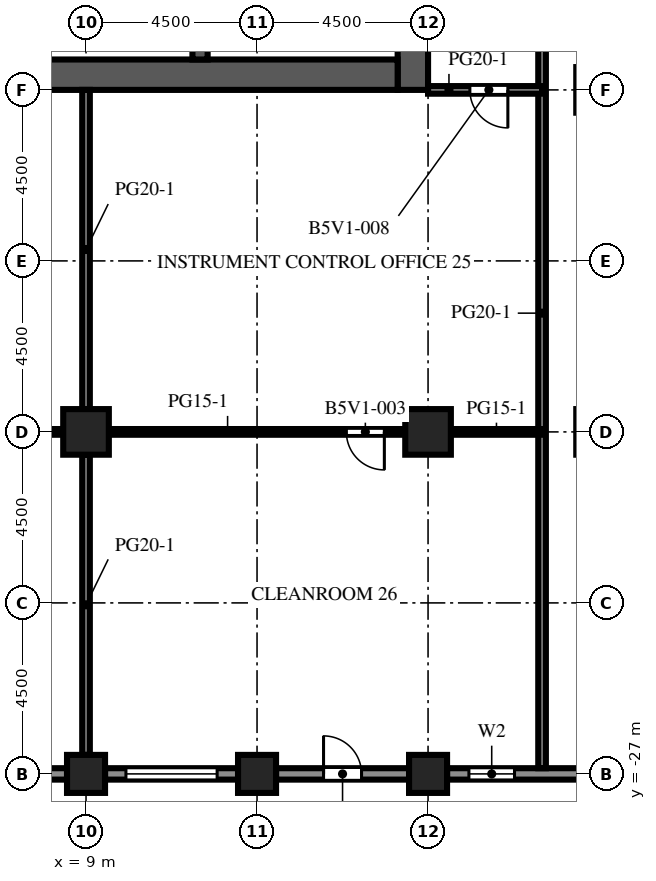
"""IFC4 building model, lengths in metres.
Left out: names, types, materials, properties, quantities, classifications, styles, units other than length and angle.
Written with IfcOpenShell. Run it as: python <this file> out.ifc"""

import sys

from ifc_helpers import new_model, si_unit, direction, frame, frame_2d, origin, origin_2d, place, context, subcontext, project, spatial, rectangle, extrude, element, fill, save


model = new_model("IFC4")
c1 = context("Model", 3, precision=1e-05, world=origin(), true_north=direction((0.0, 1.0)))
c2 = subcontext(c1, "Body", "Model", "MODEL_VIEW")
j1 = project(units=[si_unit("LENGTHUNIT", "METRE"), si_unit("PLANEANGLEUNIT", "RADIAN")], contexts=[c1])
p1 = place(None, origin())
s1 = spatial("IfcSite", under=j1, at=p1, CompositionType="ELEMENT")
p2 = place(p1, origin())
s2 = spatial("IfcBuilding", under=s1, at=p2, CompositionType="ELEMENT")
p3 = place(p2, frame((0.0, 0.0, 173.2)))
s3 = spatial("IfcBuildingStorey", under=s2, at=p3, CompositionType="ELEMENT", Elevation=173.2)
for number, where, z_axis, x_axis in (
    (1, (9.0, -27.0, 0.0), (0.0, 0.0, 1.0), (1.0, 0.0, 0.0)),
    (2, (13.5, -27.0, 0.0), (0.0, 0.0, 1.0), (1.0, 0.0, 0.0)),
    (3, (18.0, -27.0, 0.0), (0.0, 0.0, 1.0), (1.0, 0.0, 0.0)),
):
    element("IfcColumn", number, at=place(p3, frame(where, z_axis=z_axis, x_axis=x_axis)), inside=s3, PredefinedType="COLUMN", context=c2, shape_type="SweptSolid", body=[
        extrude(rectangle(XDim=1.0, YDim=1.0, at=origin_2d()), origin(), (0.0, 0.0, 1.0), 4.1),
    ])
for number, where, z_axis, x_axis in (
    (4, (9.0, -18.0, 0.0), (0.0, 0.0, 1.0), (1.0, 0.0, 0.0)),
    (5, (18.0, -18.0, 0.0), (0.0, 0.0, 1.0), (1.0, 0.0, 0.0)),
):
    element("IfcColumn", number, at=place(p3, frame(where, z_axis=z_axis, x_axis=x_axis)), inside=s3, PredefinedType="COLUMN", context=c2, shape_type="SweptSolid", body=[
        extrude(rectangle(XDim=1.2, YDim=1.2, at=origin_2d()), origin(), (0.0, 0.0, 1.0), 4.1),
    ])
p4 = place(p3, frame((17.6, -9.0, 0.0), z_axis=(0.0, 0.0, 1.0), x_axis=(0.0, 1.0, 0.0)))
e6 = element("IfcWall", 6, at=p4, inside=s3, PredefinedType="SHEAR", context=c2, shape_type="SweptSolid", body=[
    extrude(rectangle(XDim=27.5, YDim=0.8, at=frame_2d((13.75, 0.0))), origin(), (0.0, 0.0, 1.0), 4.1),
])
p5 = place(p4, frame((12.55, 0.0, 0.0)))
e7 = element("IfcOpeningElement", 7, at=p5, cuts=e6, PredefinedType="OPENING", context=c2, shape_type="SweptSolid", body=[
    extrude(rectangle(XDim=2.4, YDim=2.4, at=frame_2d((1.2, 1.2))), frame((0.0, 0.41, 0.0), z_axis=(0.0, -1.0, 0.0), x_axis=(1.0, 0.0, 0.0)), (0.0, 0.0, 1.0), 0.82),
])
p6 = place(p4, frame((6.825, 0.0, 0.0)))
e8 = element("IfcOpeningElement", 8, at=p6, cuts=e6, PredefinedType="OPENING", context=c2, shape_type="SweptSolid", body=[
    extrude(rectangle(XDim=1.2, YDim=2.1, at=frame_2d((0.6, 1.05))), frame((0.0, 0.41, 0.0), z_axis=(0.0, -1.0, 0.0), x_axis=(1.0, 0.0, 0.0)), (0.0, 0.0, 1.0), 0.82),
])
p7 = place(p4, frame((19.475, 0.0, 0.0)))
e9 = element("IfcOpeningElement", 9, at=p7, cuts=e6, PredefinedType="OPENING", context=c2, shape_type="SweptSolid", body=[
    extrude(rectangle(XDim=1.2, YDim=2.1, at=frame_2d((0.6, 1.05))), frame((0.0, 0.41, 0.0), z_axis=(0.0, -1.0, 0.0), x_axis=(1.0, 0.0, 0.0)), (0.0, 0.0, 1.0), 0.82),
])
p8 = place(p3, frame((6.8, -8.6, 0.0), z_axis=(0.0, 0.0, 1.0), x_axis=(1.0, 0.0, 0.0)))
e10 = element("IfcWall", 10, at=p8, inside=s3, PredefinedType="SHEAR", context=c2, shape_type="SweptSolid", body=[
    extrude(rectangle(XDim=10.4, YDim=0.8, at=frame_2d((5.2, 0.0))), origin(), (0.0, 0.0, 1.0), 4.1),
])
p9 = place(p3, frame((12.0, -8.2, 0.0), z_axis=(0.0, 0.0, 1.0), x_axis=(0.0, 1.0, 0.0)))
e11 = element("IfcWall", 11, at=p9, inside=s3, PredefinedType="SHEAR", context=c2, shape_type="SweptSolid", body=[
    extrude(rectangle(XDim=7.5, YDim=0.4, at=frame_2d((3.75, 0.0))), origin(), (0.0, 0.0, 1.0), 4.1),
])
p10 = place(p3, frame((8.5, -27.0, 0.0), z_axis=(0.0, 0.0, 1.0), x_axis=(-1.0, 0.0, 0.0)))
e12 = element("IfcWall", 12, at=p10, inside=s3, PredefinedType="SOLIDWALL", context=c2, shape_type="SweptSolid", body=[
    extrude(rectangle(XDim=3.5, YDim=0.3, at=frame_2d((1.75, 0.0))), origin(), (0.0, 0.0, 1.0), 2.85),
])
p11 = place(p10, frame((0.55, 0.0, 0.8)))
e13 = element("IfcOpeningElement", 13, at=p11, cuts=e12, PredefinedType="OPENING", context=c2, shape_type="SweptSolid", body=[
    extrude(rectangle(XDim=2.4, YDim=1.7, at=frame_2d((1.2, 0.85))), frame((0.0, 0.16, 0.0), z_axis=(0.0, -1.0, 0.0), x_axis=(1.0, 0.0, 0.0)), (0.0, 0.0, 1.0), 0.32),
])
p12 = place(p3, frame((13.0, -27.0, 0.0), z_axis=(0.0, 0.0, 1.0), x_axis=(-1.0, 0.0, 0.0)))
e14 = element("IfcWall", 14, at=p12, inside=s3, PredefinedType="SOLIDWALL", context=c2, shape_type="SweptSolid", body=[
    extrude(rectangle(XDim=3.5, YDim=0.3, at=frame_2d((1.75, 0.0))), origin(), (0.0, 0.0, 1.0), 2.85),
])
p13 = place(p12, frame((0.55, 0.0, 0.8)))
e15 = element("IfcOpeningElement", 15, at=p13, cuts=e14, PredefinedType="OPENING", context=c2, shape_type="SweptSolid", body=[
    extrude(rectangle(XDim=2.4, YDim=1.7, at=frame_2d((1.2, 0.85))), frame((0.0, 0.16, 0.0), z_axis=(0.0, -1.0, 0.0), x_axis=(1.0, 0.0, 0.0)), (0.0, 0.0, 1.0), 0.32),
])
p14 = place(p3, frame((17.5, -27.0, 0.0), z_axis=(0.0, 0.0, 1.0), x_axis=(-1.0, 0.0, 0.0)))
e16 = element("IfcWall", 16, at=p14, inside=s3, PredefinedType="SOLIDWALL", context=c2, shape_type="SweptSolid", body=[
    extrude(rectangle(XDim=3.5, YDim=0.3, at=frame_2d((1.75, 0.0))), origin(), (0.0, 0.0, 1.0), 2.85),
])
p15 = place(p14, frame((1.25, 0.0, 0.0)))
e17 = element("IfcOpeningElement", 17, at=p15, cuts=e16, PredefinedType="OPENING", context=c2, shape_type="SweptSolid", body=[
    extrude(rectangle(XDim=1.0, YDim=2.2, at=frame_2d((0.5, 1.1))), frame((0.0, 0.16, 0.0), z_axis=(0.0, -1.0, 0.0), x_axis=(1.0, 0.0, 0.0)), (0.0, 0.0, 1.0), 0.32),
])
p16 = place(p3, frame((22.0, -27.0, 0.0), z_axis=(0.0, 0.0, 1.0), x_axis=(-1.0, 0.0, 0.0)))
e18 = element("IfcWall", 18, at=p16, inside=s3, PredefinedType="SOLIDWALL", context=c2, shape_type="SweptSolid", body=[
    extrude(rectangle(XDim=3.5, YDim=0.3, at=frame_2d((1.75, 0.0))), origin(), (0.0, 0.0, 1.0), 2.85),
])
p17 = place(p16, frame((1.725, 0.0, 0.8)))
e19 = element("IfcOpeningElement", 19, at=p17, cuts=e18, PredefinedType="OPENING", context=c2, shape_type="SweptSolid", body=[
    extrude(rectangle(XDim=1.2, YDim=1.7, at=frame_2d((0.6, 0.85))), frame((0.0, 0.16, 0.0), z_axis=(0.0, -1.0, 0.0), x_axis=(1.0, 0.0, 0.0)), (0.0, 0.0, 1.0), 0.32),
])
p18 = place(p3, frame((8.3, -8.2, 0.0), z_axis=(0.0, 0.0, 1.0), x_axis=(0.0, 1.0, 0.0)))
e20 = element("IfcWall", 20, at=p18, inside=s3, PredefinedType="PARTITIONING", context=c2, shape_type="SweptSolid", body=[
    extrude(rectangle(XDim=2.55, YDim=0.1, at=frame_2d((1.275, 0.0))), origin(), (0.0, 0.0, 1.0), 3.65),
])
p19 = place(p18, frame((0.775, 0.0, 0.0)))
e21 = element("IfcOpeningElement", 21, at=p19, cuts=e20, PredefinedType="OPENING", context=c2, shape_type="SweptSolid", body=[
    extrude(rectangle(XDim=1.0, YDim=2.1, at=frame_2d((0.5, 1.05))), frame((0.0, 0.06, 0.0), z_axis=(0.0, -1.0, 0.0), x_axis=(1.0, 0.0, 0.0)), (0.0, 0.0, 1.0), 0.12),
])
p20 = place(p3, frame((9.0, -26.5, 0.0), z_axis=(0.0, 0.0, 1.0), x_axis=(0.0, 1.0, 0.0)))
e22 = element("IfcWall", 22, at=p20, inside=s3, PredefinedType="PARTITIONING", context=c2, shape_type="SweptSolid", body=[
    extrude(rectangle(XDim=7.9, YDim=0.2, at=frame_2d((3.95, 0.0))), origin(), (0.0, 0.0, 1.0), 3.65),
])
p21 = place(p3, frame((9.0, -17.4, 0.0), z_axis=(0.0, 0.0, 1.0), x_axis=(0.0, 1.0, 0.0)))
e23 = element("IfcWall", 23, at=p21, inside=s3, PredefinedType="PARTITIONING", context=c2, shape_type="SweptSolid", body=[
    extrude(rectangle(XDim=8.4, YDim=0.2, at=frame_2d((4.2, 0.0))), origin(), (0.0, 0.0, 1.0), 3.65),
])
p22 = place(p3, frame((21.0, 3.25, 0.0), z_axis=(0.0, 0.0, 1.0), x_axis=(0.0, -1.0, 0.0)))
e24 = element("IfcWall", 24, at=p22, inside=s3, PredefinedType="PARTITIONING", context=c2, shape_type="SweptSolid", body=[
    extrude(rectangle(XDim=30.1, YDim=0.2, at=frame_2d((15.05, 0.0))), origin(), (0.0, 0.0, 1.0), 3.65),
])
p23 = place(p22, frame((5.15, 0.0, 0.0)))
e25 = element("IfcOpeningElement", 25, at=p23, cuts=e24, PredefinedType="OPENING", context=c2, shape_type="SweptSolid", body=[
    extrude(rectangle(XDim=1.0, YDim=2.1, at=frame_2d((0.5, 1.05))), frame((0.0, 0.11, 0.0), z_axis=(0.0, -1.0, 0.0), x_axis=(1.0, 0.0, 0.0)), (0.0, 0.0, 1.0), 0.22),
])
p24 = place(p3, frame((8.4, -18.0, 0.0), z_axis=(0.0, 0.0, 1.0), x_axis=(-1.0, 0.0, 0.0)))
e26 = element("IfcWall", 26, at=p24, inside=s3, PredefinedType="PARTITIONING", context=c2, shape_type="SweptSolid", body=[
    extrude(rectangle(XDim=7.8, YDim=0.15, at=frame_2d((3.9, 0.0))), origin(), (0.0, 0.0, 1.0), 3.65),
])
p25 = place(p24, frame((5.8, 0.0, 0.0)))
e27 = element("IfcOpeningElement", 27, at=p25, cuts=e26, PredefinedType="OPENING", context=c2, shape_type="SweptSolid", body=[
    extrude(rectangle(XDim=1.0, YDim=2.1, at=frame_2d((0.5, 1.05))), frame((0.0, 0.085, 0.0), z_axis=(0.0, -1.0, 0.0), x_axis=(1.0, 0.0, 0.0)), (0.0, 0.0, 1.0), 0.17),
])
p26 = place(p3, frame((17.4, -18.0, 0.0), z_axis=(0.0, 0.0, 1.0), x_axis=(-1.0, 0.0, 0.0)))
e28 = element("IfcWall", 28, at=p26, inside=s3, PredefinedType="PARTITIONING", context=c2, shape_type="SweptSolid", body=[
    extrude(rectangle(XDim=7.8, YDim=0.15, at=frame_2d((3.9, 0.0))), origin(), (0.0, 0.0, 1.0), 3.65),
])
p27 = place(p26, frame((0.55, 0.0, 0.0)))
e29 = element("IfcOpeningElement", 29, at=p27, cuts=e28, PredefinedType="OPENING", context=c2, shape_type="SweptSolid", body=[
    extrude(rectangle(XDim=1.0, YDim=2.1, at=frame_2d((0.5, 1.05))), frame((0.0, 0.085, 0.0), z_axis=(0.0, -1.0, 0.0), x_axis=(1.0, 0.0, 0.0)), (0.0, 0.0, 1.0), 0.17),
])
p28 = place(p3, frame((18.6, -18.0, 0.0), z_axis=(0.0, 0.0, 1.0), x_axis=(1.0, 0.0, 0.0)))
e30 = element("IfcWall", 30, at=p28, inside=s3, PredefinedType="PARTITIONING", context=c2, shape_type="SweptSolid", body=[
    extrude(rectangle(XDim=2.4, YDim=0.15, at=frame_2d((1.2, 0.0))), origin(), (0.0, 0.0, 1.0), 3.65),
])
p29 = place(p3, frame((21.0, -9.0, 0.0), z_axis=(0.0, 0.0, 1.0), x_axis=(-1.0, 0.0, 0.0)))
e31 = element("IfcWall", 31, at=p29, inside=s3, PredefinedType="PARTITIONING", context=c2, shape_type="SweptSolid", body=[
    extrude(rectangle(XDim=3.0, YDim=0.2, at=frame_2d((1.5, 0.0))), origin(), (0.0, 0.0, 1.0), 3.65),
])
p30 = place(p29, frame((0.9, 0.0, 0.0)))
e32 = element("IfcOpeningElement", 32, at=p30, cuts=e31, PredefinedType="OPENING", context=c2, shape_type="SweptSolid", body=[
    extrude(rectangle(XDim=1.0, YDim=2.1, at=frame_2d((0.5, 1.05))), frame((0.0, 0.11, 0.0), z_axis=(0.0, -1.0, 0.0), x_axis=(1.0, 0.0, 0.0)), (0.0, 0.0, 1.0), 0.22),
])
p31 = place(p13, origin())
e33 = element("IfcWindow", 33, at=p31, inside=s3, PartitioningType="SINGLE_PANEL", PredefinedType="WINDOW", context=c2, shape_type="SweptSolid", body=[
    extrude(rectangle(XDim=2.4, YDim=1.7, at=frame_2d((1.2, 0.85))), frame((0.0, 0.03, 0.0), z_axis=(0.0, -1.0, 0.0), x_axis=(1.0, 0.0, 0.0)), (0.0, 0.0, 1.0), 0.06),
])
fill(e15, e33)
p32 = place(p15, origin())
e34 = element("IfcDoor", 34, at=p32, inside=s3, OperationType="SINGLE_SWING_RIGHT", PredefinedType="DOOR", context=c2, shape_type="SweptSolid", body=[
    extrude(rectangle(XDim=1.0, YDim=2.2, at=frame_2d((0.5, 1.1))), frame((0.0, 0.025, 0.0), z_axis=(0.0, -1.0, 0.0), x_axis=(1.0, 0.0, 0.0)), (0.0, 0.0, 1.0), 0.05),
])
fill(e17, e34)
p33 = place(p17, origin())
e35 = element("IfcWindow", 35, at=p33, inside=s3, PartitioningType="SINGLE_PANEL", PredefinedType="WINDOW", context=c2, shape_type="SweptSolid", body=[
    extrude(rectangle(XDim=1.2, YDim=1.7, at=frame_2d((0.6, 0.85))), frame((0.0, 0.03, 0.0), z_axis=(0.0, -1.0, 0.0), x_axis=(1.0, 0.0, 0.0)), (0.0, 0.0, 1.0), 0.06),
])
fill(e19, e35)
p34 = place(p27, origin())
e36 = element("IfcDoor", 36, at=p34, inside=s3, OperationType="SINGLE_SWING_LEFT", PredefinedType="DOOR", context=c2, shape_type="SweptSolid", body=[
    extrude(rectangle(XDim=1.0, YDim=2.1, at=frame_2d((0.5, 1.05))), frame((0.0, 0.025, 0.0), z_axis=(0.0, -1.0, 0.0), x_axis=(1.0, 0.0, 0.0)), (0.0, 0.0, 1.0), 0.05),
])
fill(e29, e36)
p35 = place(p30, origin())
e37 = element("IfcDoor", 37, at=p35, inside=s3, OperationType="SINGLE_SWING_LEFT", PredefinedType="DOOR", context=c2, shape_type="SweptSolid", body=[
    extrude(rectangle(XDim=1.0, YDim=2.1, at=frame_2d((0.5, 1.05))), frame((0.0, 0.025, 0.0), z_axis=(0.0, -1.0, 0.0), x_axis=(1.0, 0.0, 0.0)), (0.0, 0.0, 1.0), 0.05),
])
fill(e32, e37)
save(model, sys.argv[1])
